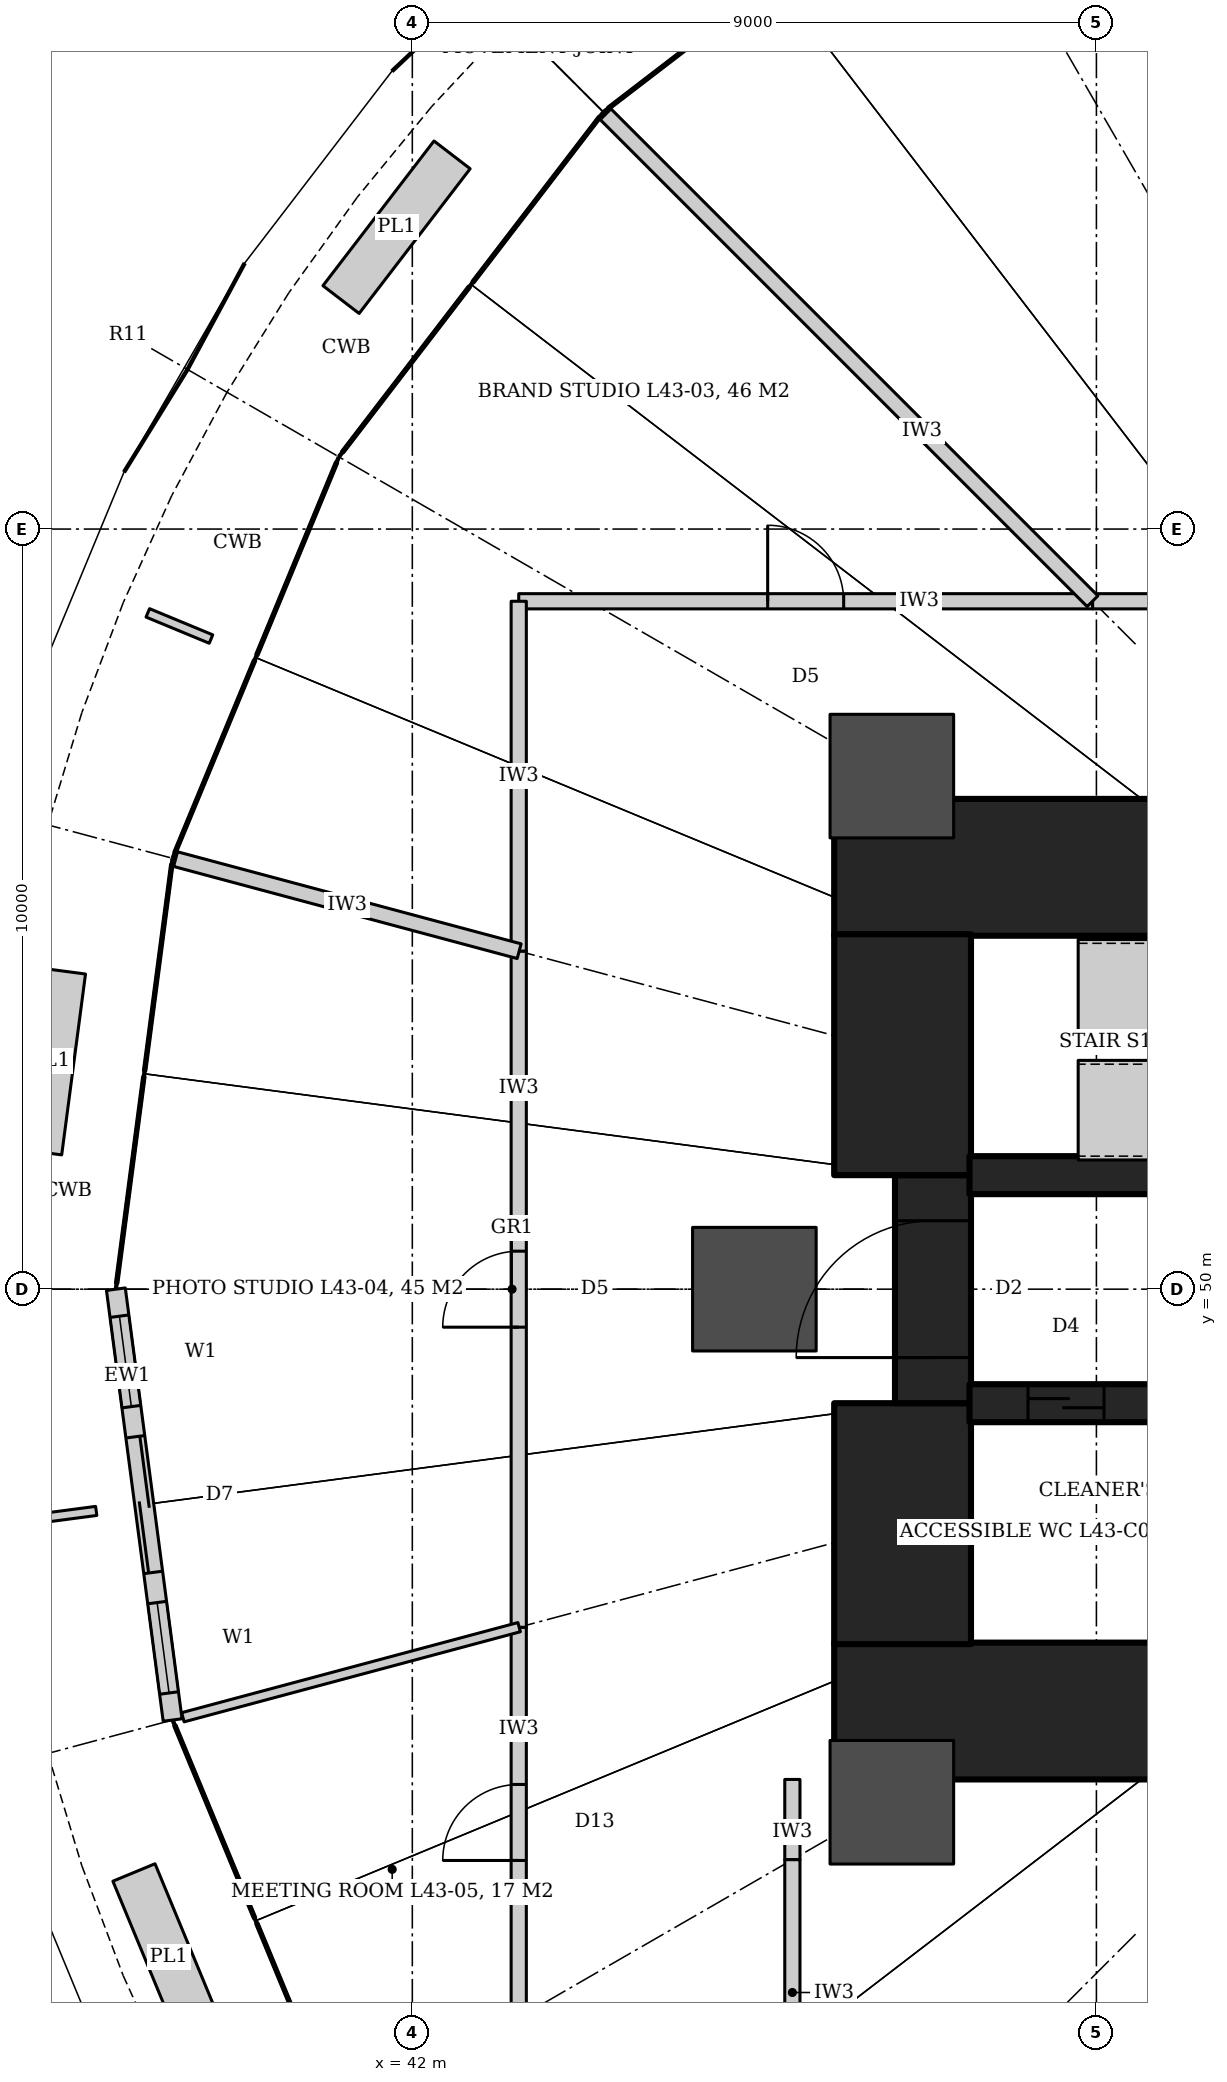
"""IFC4 building model, lengths in metres.
Left out: names, types, materials, properties, quantities, classifications, styles, units other than length and angle.
Written with IfcOpenShell. Run it as: python <this file> out.ifc"""

import sys

from ifc_helpers import new_model, si_unit, direction, frame, frame_2d, origin, origin_2d, place, context, subcontext, project, spatial, rectangle, hollow_circle, extrude, element, fill, save


model = new_model("IFC4")
c1 = context("Model", 3, precision=1e-05, world=origin(), true_north=direction((0.0, 1.0)))
c2 = subcontext(c1, "Body", "Model", "MODEL_VIEW")
j1 = project(units=[si_unit("LENGTHUNIT", "METRE"), si_unit("PLANEANGLEUNIT", "RADIAN")], contexts=[c1])
p1 = place(None, origin())
s1 = spatial("IfcSite", under=j1, at=p1, CompositionType="ELEMENT")
p2 = place(p1, origin())
s2 = spatial("IfcBuilding", under=s1, at=p2, CompositionType="ELEMENT")
p3 = place(p2, frame((0.0, 0.0, 185.6)))
s3 = spatial("IfcBuildingStorey", under=s2, at=p3, CompositionType="ELEMENT", Elevation=185.6)
for number, where, z_axis, x_axis in (
    (1, (47.55, 55.55, 0.0), (0.0, 0.0, 1.0), (1.0, 0.0, 0.0)),
    (2, (47.55, 44.45, 0.0), (0.0, 0.0, 1.0), (1.0, 0.0, 0.0)),
):
    element("IfcWall", number, at=place(p3, frame(where, z_axis=z_axis, x_axis=x_axis)), inside=s3, PredefinedType="SHEAR", context=c2, shape_type="SweptSolid", body=[
        extrude(rectangle(XDim=7.85, YDim=1.8, at=frame_2d((3.925, 0.0))), origin(), (0.0, 0.0, 1.0), 4.2),
    ])
p4 = place(p3, frame((48.45, 45.33, 0.0), z_axis=(0.0, 0.0, 1.0), x_axis=(0.0, 1.0, 0.0)))
e3 = element("IfcWall", 3, at=p4, inside=s3, PredefinedType="SHEAR", context=c2, shape_type="SweptSolid", body=[
    extrude(rectangle(XDim=3.17, YDim=1.8, at=frame_2d((1.585, 0.0))), origin(), (0.0, 0.0, 1.0), 4.2),
])
p5 = place(p3, frame((48.85, 48.5, 0.0), z_axis=(0.0, 0.0, 1.0), x_axis=(0.0, 1.0, 0.0)))
e4 = element("IfcWall", 4, at=p5, inside=s3, PredefinedType="SHEAR", context=c2, shape_type="SweptSolid", body=[
    extrude(rectangle(XDim=3.0, YDim=1.0, at=frame_2d((1.5, 0.0))), origin(), (0.0, 0.0, 1.0), 4.2),
])
p6 = place(p5, frame((0.6, 0.0, 0.0)))
e5 = element("IfcOpeningElement", 5, at=p6, cuts=e4, PredefinedType="OPENING", context=c2, shape_type="SweptSolid", body=[
    extrude(rectangle(XDim=1.8, YDim=2.1, at=frame_2d((0.9, 1.05))), frame((0.0, 0.51, 0.0), z_axis=(0.0, -1.0, 0.0), x_axis=(1.0, 0.0, 0.0)), (0.0, 0.0, 1.0), 1.02),
])
p7 = place(p3, frame((48.45, 51.5, 0.0), z_axis=(0.0, 0.0, 1.0), x_axis=(0.0, 1.0, 0.0)))
e6 = element("IfcWall", 6, at=p7, inside=s3, PredefinedType="SHEAR", context=c2, shape_type="SweptSolid", body=[
    extrude(rectangle(XDim=3.17, YDim=1.8, at=frame_2d((1.585, 0.0))), origin(), (0.0, 0.0, 1.0), 4.2),
])
p8 = place(p3, frame((49.33, 51.5, 0.0), z_axis=(0.0, 0.0, 1.0), x_axis=(1.0, 0.0, 0.0)))
e7 = element("IfcWall", 7, at=p8, inside=s3, PredefinedType="SHEAR", context=c2, shape_type="SweptSolid", body=[
    extrude(rectangle(XDim=6.07, YDim=0.5, at=frame_2d((3.035, 0.0))), origin(), (0.0, 0.0, 1.0), 4.2),
])
p9 = place(p8, frame((4.57, 0.0, 0.0)))
e8 = element("IfcOpeningElement", 8, at=p9, cuts=e7, PredefinedType="OPENING", context=c2, shape_type="SweptSolid", body=[
    extrude(rectangle(XDim=1.0, YDim=2.1, at=frame_2d((0.5, 1.05))), frame((0.0, 0.26, 0.0), z_axis=(0.0, -1.0, 0.0), x_axis=(1.0, 0.0, 0.0)), (0.0, 0.0, 1.0), 0.52),
])
p10 = place(p3, frame((49.33, 48.5, 0.0), z_axis=(0.0, 0.0, 1.0), x_axis=(1.0, 0.0, 0.0)))
e9 = element("IfcWall", 9, at=p10, inside=s3, PredefinedType="SHEAR", context=c2, shape_type="SweptSolid", body=[
    extrude(rectangle(XDim=6.07, YDim=0.5, at=frame_2d((3.035, 0.0))), origin(), (0.0, 0.0, 1.0), 4.2),
])
p11 = place(p10, frame((0.77, 0.0, 0.0)))
e10 = element("IfcOpeningElement", 10, at=p11, cuts=e9, PredefinedType="OPENING", context=c2, shape_type="SweptSolid", body=[
    extrude(rectangle(XDim=1.0, YDim=2.1, at=frame_2d((0.5, 1.05))), frame((0.0, 0.26, 0.0), z_axis=(0.0, -1.0, 0.0), x_axis=(1.0, 0.0, 0.0)), (0.0, 0.0, 1.0), 0.52),
])
p12 = place(p10, frame((2.72, 0.0, 0.0)))
e11 = element("IfcOpeningElement", 11, at=p12, cuts=e9, PredefinedType="OPENING", context=c2, shape_type="SweptSolid", body=[
    extrude(rectangle(XDim=0.9, YDim=2.1, at=frame_2d((0.45, 1.05))), frame((0.0, 0.26, 0.0), z_axis=(0.0, -1.0, 0.0), x_axis=(1.0, 0.0, 0.0)), (0.0, 0.0, 1.0), 0.52),
])
p13 = place(p10, frame((4.42, 0.0, 0.0)))
e12 = element("IfcOpeningElement", 12, at=p13, cuts=e9, PredefinedType="OPENING", context=c2, shape_type="SweptSolid", body=[
    extrude(rectangle(XDim=0.9, YDim=2.1, at=frame_2d((0.45, 1.05))), frame((0.0, 0.26, 0.0), z_axis=(0.0, -1.0, 0.0), x_axis=(1.0, 0.0, 0.0)), (0.0, 0.0, 1.0), 0.52),
])
for number, where, z_axis, x_axis in (
    (13, (48.309, 56.75, 0.0), (0.0, 0.0, 1.0), (1.0, 0.0, 0.0)),
    (14, (46.5, 50.0, 0.0), (0.0, 0.0, 1.0), (1.0, 0.0, 0.0)),
    (15, (48.309, 43.25, 0.0), (0.0, 0.0, 1.0), (1.0, 0.0, 0.0)),
):
    element("IfcColumn", number, at=place(p3, frame(where, z_axis=z_axis, x_axis=x_axis)), inside=s3, PredefinedType="COLUMN", context=c2, shape_type="SweptSolid", body=[
        extrude(hollow_circle(Radius=0.9, WallThickness=0.09, at=origin_2d()), origin(), (0.0, 0.0, 1.0), 4.2),
    ])
p14 = place(p3, frame((43.4, 59.05, 0.0), z_axis=(0.0, 0.0, 1.0), x_axis=(1.0, 0.0, 0.0)))
e16 = element("IfcWall", 16, at=p14, inside=s3, PredefinedType="PARTITIONING", context=c2, shape_type="SweptSolid", body=[
    extrude(rectangle(XDim=7.55, YDim=0.2, at=frame_2d((3.775, 0.0))), origin(), (0.0, 0.0, 1.0), 3.012),
])
p15 = place(p14, frame((3.275, 0.0, 0.0)))
e17 = element("IfcOpeningElement", 17, at=p15, cuts=e16, PredefinedType="OPENING", context=c2, shape_type="SweptSolid", body=[
    extrude(rectangle(XDim=1.0, YDim=2.1, at=frame_2d((0.5, 1.05))), frame((0.0, 0.11, 0.0), z_axis=(0.0, -1.0, 0.0), x_axis=(1.0, 0.0, 0.0)), (0.0, 0.0, 1.0), 0.22),
])
p16 = place(p3, frame((50.95, 59.05, 0.0), z_axis=(0.0, 0.0, 1.0), x_axis=(1.0, 0.0, 0.0)))
e18 = element("IfcWall", 18, at=p16, inside=s3, PredefinedType="PARTITIONING", context=c2, shape_type="SweptSolid", body=[
    extrude(rectangle(XDim=25.65, YDim=0.2, at=frame_2d((12.825, 0.0))), origin(), (0.0, 0.0, 1.0), 3.012),
])
p17 = place(p16, frame((11.825, 0.0, 0.0)))
e19 = element("IfcOpeningElement", 19, at=p17, cuts=e18, PredefinedType="OPENING", context=c2, shape_type="SweptSolid", body=[
    extrude(rectangle(XDim=2.0, YDim=2.1, at=frame_2d((1.0, 1.05))), frame((0.0, 0.11, 0.0), z_axis=(0.0, -1.0, 0.0), x_axis=(1.0, 0.0, 0.0)), (0.0, 0.0, 1.0), 0.22),
])
p18 = place(p3, frame((47.0, 43.55, 0.0), z_axis=(0.0, 0.0, 1.0), x_axis=(0.0, -1.0, 0.0)))
e20 = element("IfcWall", 20, at=p18, inside=s3, PredefinedType="PARTITIONING", context=c2, shape_type="SweptSolid", body=[
    extrude(rectangle(XDim=1.056, YDim=0.2, at=frame_2d((0.528, 0.0))), origin(), (0.0, 0.0, 1.0), 3.012),
])
p19 = place(p3, frame((47.0, 42.494, 0.0), z_axis=(0.0, 0.0, 1.0), x_axis=(0.0, -1.0, 0.0)))
e21 = element("IfcWall", 21, at=p19, inside=s3, PredefinedType="PARTITIONING", context=c2, shape_type="SweptSolid", body=[
    extrude(rectangle(XDim=3.494, YDim=0.2, at=frame_2d((1.747, 0.0))), origin(), (0.0, 0.0, 1.0), 3.012),
])
p20 = place(p19, frame((0.747, 0.0, 0.0)))
e22 = element("IfcOpeningElement", 22, at=p20, cuts=e21, PredefinedType="OPENING", context=c2, shape_type="SweptSolid", body=[
    extrude(rectangle(XDim=2.0, YDim=2.1, at=frame_2d((1.0, 1.05))), frame((0.0, 0.11, 0.0), z_axis=(0.0, -1.0, 0.0), x_axis=(1.0, 0.0, 0.0)), (0.0, 0.0, 1.0), 0.22),
])
p21 = place(p3, frame((43.4, 41.292, 0.0), z_axis=(0.0, 0.0, 1.0), x_axis=(0.0, 1.0, 0.0)))
e23 = element("IfcWall", 23, at=p21, inside=s3, PredefinedType="PARTITIONING", context=c2, shape_type="SweptSolid", body=[
    extrude(rectangle(XDim=4.26, YDim=0.2, at=frame_2d((2.13, 0.0))), origin(), (0.0, 0.0, 1.0), 3.012),
])
p22 = place(p21, frame((1.63, 0.0, 0.0)))
e24 = element("IfcOpeningElement", 24, at=p22, cuts=e23, PredefinedType="OPENING", context=c2, shape_type="SweptSolid", body=[
    extrude(rectangle(XDim=1.0, YDim=2.4, at=frame_2d((0.5, 1.2))), frame((0.0, 0.11, 0.0), z_axis=(0.0, -1.0, 0.0), x_axis=(1.0, 0.0, 0.0)), (0.0, 0.0, 1.0), 0.22),
])
p23 = place(p3, frame((43.4, 45.552, 0.0), z_axis=(0.0, 0.0, 1.0), x_axis=(0.0, 1.0, 0.0)))
e25 = element("IfcWall", 25, at=p23, inside=s3, PredefinedType="PARTITIONING", context=c2, shape_type="SweptSolid", body=[
    extrude(rectangle(XDim=8.896, YDim=0.2, at=frame_2d((4.448, 0.0))), origin(), (0.0, 0.0, 1.0), 3.012),
])
p24 = place(p23, frame((3.948, 0.0, 0.0)))
e26 = element("IfcOpeningElement", 26, at=p24, cuts=e25, PredefinedType="OPENING", context=c2, shape_type="SweptSolid", body=[
    extrude(rectangle(XDim=1.0, YDim=2.1, at=frame_2d((0.5, 1.05))), frame((0.0, 0.11, 0.0), z_axis=(0.0, -1.0, 0.0), x_axis=(1.0, 0.0, 0.0)), (0.0, 0.0, 1.0), 0.22),
])
p25 = place(p3, frame((43.4, 54.448, 0.0), z_axis=(0.0, 0.0, 1.0), x_axis=(0.0, 1.0, 0.0)))
e27 = element("IfcWall", 27, at=p25, inside=s3, PredefinedType="PARTITIONING", context=c2, shape_type="SweptSolid", body=[
    extrude(rectangle(XDim=4.602, YDim=0.2, at=frame_2d((2.301, 0.0))), origin(), (0.0, 0.0, 1.0), 3.012),
])
p26 = place(p3, frame((50.949, 59.051, 0.0), z_axis=(0.0, 0.0, 1.0), x_axis=(-0.707106781187, 0.707106781187, 0.0)))
e28 = element("IfcWall", 28, at=p26, inside=s3, PredefinedType="PARTITIONING", context=c2, shape_type="SweptSolid", body=[
    extrude(rectangle(XDim=9.16, YDim=0.2, at=frame_2d((4.58, 0.0))), origin(), (0.0, 0.0, 1.0), 3.012),
])
p27 = place(p3, frame((43.406, 54.447, 0.0), z_axis=(0.0, 0.0, 1.0), x_axis=(-0.965931637459, 0.258797356546, 0.0)))
e29 = element("IfcWall", 29, at=p27, inside=s3, PredefinedType="PARTITIONING", context=c2, shape_type="SweptSolid", body=[
    extrude(rectangle(XDim=4.78, YDim=0.2, at=frame_2d((2.39, 0.0))), origin(), (0.0, 0.0, 1.0), 3.012),
])
p28 = place(p3, frame((43.406, 45.553, 0.0), z_axis=(0.0, 0.0, 1.0), x_axis=(-0.965930354879, -0.258802143582, 0.0)))
e30 = element("IfcWall", 30, at=p28, inside=s3, PredefinedType="PARTITIONING", context=c2, shape_type="SweptSolid", body=[
    extrude(rectangle(XDim=4.68, YDim=0.125, at=frame_2d((2.34, 0.0))), origin(), (0.0, 0.0, 1.0), 3.012),
])
p29 = place(p3, frame((38.0, 50.0, 0.0), z_axis=(0.0, 0.0, 1.0), x_axis=(0.130503995834, -0.991447783331, 0.0)))
e31 = element("IfcWall", 31, at=p29, inside=s3, PredefinedType="SOLIDWALL", context=c2, shape_type="SweptSolid", body=[
    extrude(rectangle(XDim=5.743, YDim=0.25, at=frame_2d((2.872, 0.0))), origin(), (0.0, 0.0, 1.0), 4.04),
])
p30 = place(p29, frame((1.972, 0.0, 0.0)))
e32 = element("IfcOpeningElement", 32, at=p30, cuts=e31, PredefinedType="OPENING", context=c2, shape_type="SweptSolid", body=[
    extrude(rectangle(XDim=1.8, YDim=2.4, at=frame_2d((0.9, 1.2))), frame((0.0, 0.135, 0.0), z_axis=(0.0, -1.0, 0.0), x_axis=(1.0, 0.0, 0.0)), (0.0, 0.0, 1.0), 0.27),
])
p31 = place(p29, frame((0.372, 0.0, 0.0)))
e33 = element("IfcOpeningElement", 33, at=p31, cuts=e31, PredefinedType="OPENING", context=c2, shape_type="SweptSolid", body=[
    extrude(rectangle(XDim=1.2, YDim=2.4, at=frame_2d((0.6, 1.2))), frame((0.0, 0.135, 0.0), z_axis=(0.0, -1.0, 0.0), x_axis=(1.0, 0.0, 0.0)), (0.0, 0.0, 1.0), 0.27),
])
p32 = place(p29, frame((4.172, 0.0, 0.0)))
e34 = element("IfcOpeningElement", 34, at=p32, cuts=e31, PredefinedType="OPENING", context=c2, shape_type="SweptSolid", body=[
    extrude(rectangle(XDim=1.2, YDim=2.4, at=frame_2d((0.6, 1.2))), frame((0.0, 0.135, 0.0), z_axis=(0.0, -1.0, 0.0), x_axis=(1.0, 0.0, 0.0)), (0.0, 0.0, 1.0), 0.27),
])
p33 = place(p15, origin())
e35 = element("IfcDoor", 35, at=p33, inside=s3, OperationType="SINGLE_SWING_LEFT", PredefinedType="DOOR", context=c2, shape_type="SweptSolid", body=[
    extrude(rectangle(XDim=1.0, YDim=2.1, at=frame_2d((0.5, 1.05))), frame((0.0, 0.025, 0.0), z_axis=(0.0, -1.0, 0.0), x_axis=(1.0, 0.0, 0.0)), (0.0, 0.0, 1.0), 0.05),
])
fill(e17, e35)
p34 = place(p24, origin())
e36 = element("IfcDoor", 36, at=p34, inside=s3, OperationType="SINGLE_SWING_LEFT", PredefinedType="DOOR", context=c2, shape_type="SweptSolid", body=[
    extrude(rectangle(XDim=1.0, YDim=2.1, at=frame_2d((0.5, 1.05))), frame((0.0, 0.025, 0.0), z_axis=(0.0, -1.0, 0.0), x_axis=(1.0, 0.0, 0.0)), (0.0, 0.0, 1.0), 0.05),
])
fill(e26, e36)
p35 = place(p22, origin())
e37 = element("IfcDoor", 37, at=p35, inside=s3, OperationType="SINGLE_SWING_LEFT", PredefinedType="DOOR", context=c2, shape_type="SweptSolid", body=[
    extrude(rectangle(XDim=1.0, YDim=2.4, at=frame_2d((0.5, 1.2))), frame((0.0, 0.025, 0.0), z_axis=(0.0, -1.0, 0.0), x_axis=(1.0, 0.0, 0.0)), (0.0, 0.0, 1.0), 0.05),
])
fill(e24, e37)
p36 = place(p20, origin())
e38 = element("IfcDoor", 38, at=p36, inside=s3, OperationType="DOUBLE_DOOR_DOUBLE_SWING", PredefinedType="DOOR", context=c2, shape_type="SweptSolid", body=[
    extrude(rectangle(XDim=2.0, YDim=2.1, at=frame_2d((1.0, 1.05))), frame((0.0, 0.025, 0.0), z_axis=(0.0, -1.0, 0.0), x_axis=(1.0, 0.0, 0.0)), (0.0, 0.0, 1.0), 0.05),
])
fill(e22, e38)
p37 = place(p30, origin())
e39 = element("IfcDoor", 39, at=p37, inside=s3, OperationType="DOUBLE_DOOR_SLIDING", PredefinedType="DOOR", context=c2, shape_type="SweptSolid", body=[
    extrude(rectangle(XDim=1.8, YDim=2.4, at=frame_2d((0.9, 1.2))), frame((0.0, 0.025, 0.0), z_axis=(0.0, -1.0, 0.0), x_axis=(1.0, 0.0, 0.0)), (0.0, 0.0, 1.0), 0.05),
])
fill(e32, e39)
p38 = place(p31, origin())
e40 = element("IfcWindow", 40, at=p38, inside=s3, PartitioningType="SINGLE_PANEL", PredefinedType="WINDOW", context=c2, shape_type="SweptSolid", body=[
    extrude(rectangle(XDim=1.2, YDim=2.4, at=frame_2d((0.6, 1.2))), frame((0.0, 0.03, 0.0), z_axis=(0.0, -1.0, 0.0), x_axis=(1.0, 0.0, 0.0)), (0.0, 0.0, 1.0), 0.06),
])
fill(e33, e40)
p39 = place(p32, origin())
e41 = element("IfcWindow", 41, at=p39, inside=s3, PartitioningType="SINGLE_PANEL", PredefinedType="WINDOW", context=c2, shape_type="SweptSolid", body=[
    extrude(rectangle(XDim=1.2, YDim=2.4, at=frame_2d((0.6, 1.2))), frame((0.0, 0.03, 0.0), z_axis=(0.0, -1.0, 0.0), x_axis=(1.0, 0.0, 0.0)), (0.0, 0.0, 1.0), 0.06),
])
fill(e34, e41)
p40 = place(p11, origin())
e42 = element("IfcDoor", 42, at=p40, inside=s3, OperationType="SLIDING_TO_LEFT", PredefinedType="DOOR", context=c2, shape_type="SweptSolid", body=[
    extrude(rectangle(XDim=1.0, YDim=2.1, at=frame_2d((0.5, 1.05))), frame((0.0, 0.025, 0.0), z_axis=(0.0, -1.0, 0.0), x_axis=(1.0, 0.0, 0.0)), (0.0, 0.0, 1.0), 0.05),
])
fill(e10, e42)
p41 = place(p6, origin())
e43 = element("IfcDoor", 43, at=p41, inside=s3, OperationType="DOUBLE_DOOR_DOUBLE_SWING", PredefinedType="DOOR", context=c2, shape_type="SweptSolid", body=[
    extrude(rectangle(XDim=1.8, YDim=2.1, at=frame_2d((0.9, 1.05))), frame((0.0, 0.025, 0.0), z_axis=(0.0, -1.0, 0.0), x_axis=(1.0, 0.0, 0.0)), (0.0, 0.0, 1.0), 0.05),
])
fill(e5, e43)
save(model, sys.argv[1])
